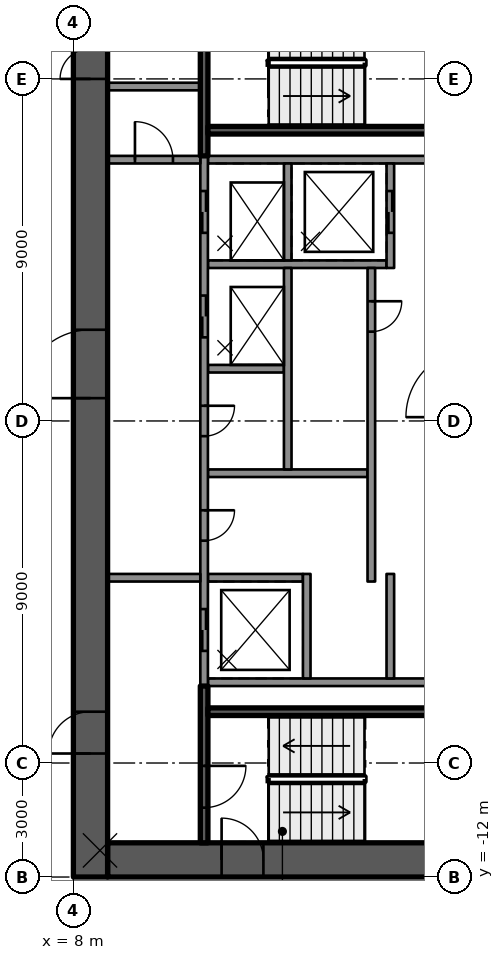
"""IFC4 building model, lengths in metres.
Left out: names, types, materials, properties, quantities, classifications, styles, units other than length and angle.
Written with IfcOpenShell. Run it as: python <this file> out.ifc"""

import sys

from ifc_helpers import new_model, si_unit, direction, frame, frame_2d, origin, place, context, subcontext, project, spatial, rectangle, extrude, element, fill, save


model = new_model("IFC4")
c1 = context("Model", 3, precision=1e-05, world=origin(), true_north=direction((0.0, 1.0)))
c2 = subcontext(c1, "Body", "Model", "MODEL_VIEW")
j1 = project(units=[si_unit("LENGTHUNIT", "METRE"), si_unit("PLANEANGLEUNIT", "RADIAN")], contexts=[c1])
p1 = place(None, origin())
s1 = spatial("IfcSite", under=j1, at=p1, CompositionType="ELEMENT")
p2 = place(p1, origin())
s2 = spatial("IfcBuilding", under=s1, at=p2, CompositionType="ELEMENT")
p3 = place(p2, frame((0.0, 0.0, 214.0)))
s3 = spatial("IfcBuildingStorey", under=s2, at=p3, CompositionType="ELEMENT", Elevation=214.0)
p4 = place(p3, frame((8.9, -11.55, 0.0), z_axis=(0.0, 0.0, 1.0), x_axis=(1.0, 0.0, 0.0)))
e1 = element("IfcWall", 1, at=p4, inside=s3, PredefinedType="SHEAR", context=c2, shape_type="SweptSolid", body=[
    extrude(rectangle(XDim=9.2, YDim=0.9, at=frame_2d((4.6, 0.0))), origin(), (0.0, 0.0, 1.0), 3.5),
])
p5 = place(p4, frame((3.0, 0.0, 0.0)))
e2 = element("IfcOpeningElement", 2, at=p5, cuts=e1, PredefinedType="OPENING", context=c2, shape_type="SweptSolid", body=[
    extrude(rectangle(XDim=1.1, YDim=2.1, at=frame_2d((0.55, 1.05))), frame((0.0, 0.46, 0.0), z_axis=(0.0, -1.0, 0.0), x_axis=(1.0, 0.0, 0.0)), (0.0, 0.0, 1.0), 0.92),
])
p6 = place(p3, frame((8.45, -12.0, 0.0), z_axis=(0.0, 0.0, 1.0), x_axis=(0.0, 1.0, 0.0)))
e3 = element("IfcWall", 3, at=p6, inside=s3, PredefinedType="SHEAR", context=c2, shape_type="SweptSolid", body=[
    extrude(rectangle(XDim=24.0, YDim=0.9, at=frame_2d((12.0, 0.0))), origin(), (0.0, 0.0, 1.0), 3.5),
])
p7 = place(p6, frame((12.6, 0.0, 0.0)))
e4 = element("IfcOpeningElement", 4, at=p7, cuts=e3, PredefinedType="OPENING", context=c2, shape_type="SweptSolid", body=[
    extrude(rectangle(XDim=1.8, YDim=2.1, at=frame_2d((0.9, 1.05))), frame((0.0, 0.46, 0.0), z_axis=(0.0, -1.0, 0.0), x_axis=(1.0, 0.0, 0.0)), (0.0, 0.0, 1.0), 0.92),
])
p8 = place(p6, frame((3.25, 0.0, 0.0)))
e5 = element("IfcOpeningElement", 5, at=p8, cuts=e3, PredefinedType="OPENING", context=c2, shape_type="SweptSolid", body=[
    extrude(rectangle(XDim=1.1, YDim=2.1, at=frame_2d((0.55, 1.05))), frame((0.0, 0.46, 0.0), z_axis=(0.0, -1.0, 0.0), x_axis=(1.0, 0.0, 0.0)), (0.0, 0.0, 1.0), 0.92),
])
p9 = place(p6, frame((21.0, 0.0, 0.0)))
e6 = element("IfcOpeningElement", 6, at=p9, cuts=e3, PredefinedType="OPENING", context=c2, shape_type="SweptSolid", body=[
    extrude(rectangle(XDim=0.8, YDim=2.1, at=frame_2d((0.4, 1.05))), frame((0.0, 0.46, 0.0), z_axis=(0.0, -1.0, 0.0), x_axis=(1.0, 0.0, 0.0)), (0.0, 0.0, 1.0), 0.92),
])
for number, where, z_axis, x_axis in (
    (7, (11.54, -6.875, 0.0), (0.0, 0.0, 1.0), (1.0, 0.0, 0.0)),
    (8, (11.54, 6.875, 0.0), (0.0, 0.0, 1.0), (1.0, 0.0, 0.0)),
):
    element("IfcWall", number, at=place(p3, frame(where, z_axis=z_axis, x_axis=x_axis)), inside=s3, PredefinedType="SOLIDWALL", context=c2, shape_type="SweptSolid", body=[
        extrude(rectangle(XDim=6.56, YDim=0.2, at=frame_2d((3.28, 0.0))), origin(), (0.0, 0.0, 1.0), 3.08),
    ])
p10 = place(p3, frame((11.54, 4.125, 0.0), z_axis=(0.0, 0.0, 1.0), x_axis=(1.0, 0.0, 0.0)))
e9 = element("IfcWall", 9, at=p10, inside=s3, PredefinedType="SOLIDWALL", context=c2, shape_type="SweptSolid", body=[
    extrude(rectangle(XDim=4.7, YDim=0.2, at=frame_2d((2.35, 0.0))), origin(), (0.0, 0.0, 1.0), 3.08),
])
p11 = place(p3, frame((11.54, 1.375, 0.0), z_axis=(0.0, 0.0, 1.0), x_axis=(1.0, 0.0, 0.0)))
e10 = element("IfcWall", 10, at=p11, inside=s3, PredefinedType="SOLIDWALL", context=c2, shape_type="SweptSolid", body=[
    extrude(rectangle(XDim=2.0, YDim=0.2, at=frame_2d((1.0, 0.0))), origin(), (0.0, 0.0, 1.0), 3.08),
])
p12 = place(p3, frame((11.54, -1.375, 0.0), z_axis=(0.0, 0.0, 1.0), x_axis=(1.0, 0.0, 0.0)))
e11 = element("IfcWall", 11, at=p12, inside=s3, PredefinedType="SOLIDWALL", context=c2, shape_type="SweptSolid", body=[
    extrude(rectangle(XDim=4.2, YDim=0.2, at=frame_2d((2.1, 0.0))), origin(), (0.0, 0.0, 1.0), 3.08),
])
p13 = place(p3, frame((11.54, -4.125, 0.0), z_axis=(0.0, 0.0, 1.0), x_axis=(1.0, 0.0, 0.0)))
e12 = element("IfcWall", 12, at=p13, inside=s3, PredefinedType="SOLIDWALL", context=c2, shape_type="SweptSolid", body=[
    extrude(rectangle(XDim=2.5, YDim=0.2, at=frame_2d((1.25, 0.0))), origin(), (0.0, 0.0, 1.0), 3.08),
])
p14 = place(p3, frame((11.44, 6.975, 0.0), z_axis=(0.0, 0.0, 1.0), x_axis=(0.0, -1.0, 0.0)))
e13 = element("IfcWall", 13, at=p14, inside=s3, PredefinedType="SOLIDWALL", context=c2, shape_type="SweptSolid", body=[
    extrude(rectangle(XDim=13.95, YDim=0.2, at=frame_2d((6.975, 0.0))), origin(), (0.0, 0.0, 1.0), 3.08),
])
p15 = place(p14, frame((0.925, 0.0, 0.0)))
e14 = element("IfcOpeningElement", 14, at=p15, cuts=e13, PredefinedType="OPENING", context=c2, shape_type="SweptSolid", body=[
    extrude(rectangle(XDim=1.1, YDim=2.1, at=frame_2d((0.55, 1.05))), frame((0.0, 0.11, 0.0), z_axis=(0.0, -1.0, 0.0), x_axis=(1.0, 0.0, 0.0)), (0.0, 0.0, 1.0), 0.22),
])
p16 = place(p14, frame((3.675, 0.0, 0.0)))
e15 = element("IfcOpeningElement", 15, at=p16, cuts=e13, PredefinedType="OPENING", context=c2, shape_type="SweptSolid", body=[
    extrude(rectangle(XDim=1.1, YDim=2.1, at=frame_2d((0.55, 1.05))), frame((0.0, 0.11, 0.0), z_axis=(0.0, -1.0, 0.0), x_axis=(1.0, 0.0, 0.0)), (0.0, 0.0, 1.0), 0.22),
])
p17 = place(p14, frame((11.925, 0.0, 0.0)))
e16 = element("IfcOpeningElement", 16, at=p17, cuts=e13, PredefinedType="OPENING", context=c2, shape_type="SweptSolid", body=[
    extrude(rectangle(XDim=1.1, YDim=2.1, at=frame_2d((0.55, 1.05))), frame((0.0, 0.11, 0.0), z_axis=(0.0, -1.0, 0.0), x_axis=(1.0, 0.0, 0.0)), (0.0, 0.0, 1.0), 0.22),
])
p18 = place(p14, frame((6.575, 0.0, 0.0)))
e17 = element("IfcOpeningElement", 17, at=p18, cuts=e13, PredefinedType="OPENING", context=c2, shape_type="SweptSolid", body=[
    extrude(rectangle(XDim=0.8, YDim=2.1, at=frame_2d((0.4, 1.05))), frame((0.0, 0.11, 0.0), z_axis=(0.0, -1.0, 0.0), x_axis=(1.0, 0.0, 0.0)), (0.0, 0.0, 1.0), 0.22),
])
p19 = place(p14, frame((9.325, 0.0, 0.0)))
e18 = element("IfcOpeningElement", 18, at=p19, cuts=e13, PredefinedType="OPENING", context=c2, shape_type="SweptSolid", body=[
    extrude(rectangle(XDim=0.8, YDim=2.1, at=frame_2d((0.4, 1.05))), frame((0.0, 0.11, 0.0), z_axis=(0.0, -1.0, 0.0), x_axis=(1.0, 0.0, 0.0)), (0.0, 0.0, 1.0), 0.22),
])
p20 = place(p3, frame((13.64, 6.775, 0.0), z_axis=(0.0, 0.0, 1.0), x_axis=(0.0, -1.0, 0.0)))
e19 = element("IfcWall", 19, at=p20, inside=s3, PredefinedType="SOLIDWALL", context=c2, shape_type="SweptSolid", body=[
    extrude(rectangle(XDim=2.55, YDim=0.2, at=frame_2d((1.275, 0.0))), origin(), (0.0, 0.0, 1.0), 3.08),
])
p21 = place(p3, frame((13.64, 4.025, 0.0), z_axis=(0.0, 0.0, 1.0), x_axis=(0.0, -1.0, 0.0)))
e20 = element("IfcWall", 20, at=p21, inside=s3, PredefinedType="SOLIDWALL", context=c2, shape_type="SweptSolid", body=[
    extrude(rectangle(XDim=5.3, YDim=0.2, at=frame_2d((2.65, 0.0))), origin(), (0.0, 0.0, 1.0), 3.08),
])
p22 = place(p3, frame((14.14, -4.025, 0.0), z_axis=(0.0, 0.0, 1.0), x_axis=(0.0, -1.0, 0.0)))
e21 = element("IfcWall", 21, at=p22, inside=s3, PredefinedType="SOLIDWALL", context=c2, shape_type="SweptSolid", body=[
    extrude(rectangle(XDim=2.75, YDim=0.2, at=frame_2d((1.375, 0.0))), origin(), (0.0, 0.0, 1.0), 3.08),
])
p23 = place(p3, frame((16.34, 6.775, 0.0), z_axis=(0.0, 0.0, 1.0), x_axis=(0.0, -1.0, 0.0)))
e22 = element("IfcWall", 22, at=p23, inside=s3, PredefinedType="SOLIDWALL", context=c2, shape_type="SweptSolid", body=[
    extrude(rectangle(XDim=2.75, YDim=0.2, at=frame_2d((1.375, 0.0))), origin(), (0.0, 0.0, 1.0), 3.08),
])
p24 = place(p23, frame((0.725, 0.0, 0.0)))
e23 = element("IfcOpeningElement", 23, at=p24, cuts=e22, PredefinedType="OPENING", context=c2, shape_type="SweptSolid", body=[
    extrude(rectangle(XDim=1.1, YDim=2.1, at=frame_2d((0.55, 1.05))), frame((0.0, 0.11, 0.0), z_axis=(0.0, -1.0, 0.0), x_axis=(1.0, 0.0, 0.0)), (0.0, 0.0, 1.0), 0.22),
])
p25 = place(p3, frame((15.84, 4.025, 0.0), z_axis=(0.0, 0.0, 1.0), x_axis=(0.0, -1.0, 0.0)))
e24 = element("IfcWall", 24, at=p25, inside=s3, PredefinedType="SOLIDWALL", context=c2, shape_type="SweptSolid", body=[
    extrude(rectangle(XDim=8.25, YDim=0.2, at=frame_2d((4.125, 0.0))), origin(), (0.0, 0.0, 1.0), 3.08),
])
p26 = place(p25, frame((0.875, 0.0, 0.0)))
e25 = element("IfcOpeningElement", 25, at=p26, cuts=e24, PredefinedType="OPENING", context=c2, shape_type="SweptSolid", body=[
    extrude(rectangle(XDim=0.8, YDim=2.1, at=frame_2d((0.4, 1.05))), frame((0.0, 0.11, 0.0), z_axis=(0.0, -1.0, 0.0), x_axis=(1.0, 0.0, 0.0)), (0.0, 0.0, 1.0), 0.22),
])
p27 = place(p3, frame((16.34, -4.025, 0.0), z_axis=(0.0, 0.0, 1.0), x_axis=(0.0, -1.0, 0.0)))
e26 = element("IfcWall", 26, at=p27, inside=s3, PredefinedType="SOLIDWALL", context=c2, shape_type="SweptSolid", body=[
    extrude(rectangle(XDim=2.75, YDim=0.2, at=frame_2d((1.375, 0.0))), origin(), (0.0, 0.0, 1.0), 3.08),
])
p28 = place(p3, frame((11.44, -6.975, 0.0), z_axis=(0.0, 0.0, 1.0), x_axis=(0.0, -1.0, 0.0)))
e27 = element("IfcWall", 27, at=p28, inside=s3, PredefinedType="SOLIDWALL", context=c2, shape_type="SweptSolid", body=[
    extrude(rectangle(XDim=4.125, YDim=0.2, at=frame_2d((2.062, 0.0))), origin(), (0.0, 0.0, 1.0), 3.08),
])
p29 = place(p28, frame((2.1, 0.0, 0.0)))
e28 = element("IfcOpeningElement", 28, at=p29, cuts=e27, PredefinedType="OPENING", context=c2, shape_type="SweptSolid", body=[
    extrude(rectangle(XDim=1.1, YDim=2.1, at=frame_2d((0.55, 1.05))), frame((0.0, 0.11, 0.0), z_axis=(0.0, -1.0, 0.0), x_axis=(1.0, 0.0, 0.0)), (0.0, 0.0, 1.0), 0.22),
])
p30 = place(p3, frame((11.54, -7.65, 0.0), z_axis=(0.0, 0.0, 1.0), x_axis=(1.0, 0.0, 0.0)))
e29 = element("IfcWall", 29, at=p30, inside=s3, PredefinedType="SOLIDWALL", context=c2, shape_type="SweptSolid", body=[
    extrude(rectangle(XDim=6.56, YDim=0.2, at=frame_2d((3.28, 0.0))), origin(), (0.0, 0.0, 1.0), 3.08),
])
p31 = place(p3, frame((11.44, 11.1, 0.0), z_axis=(0.0, 0.0, 1.0), x_axis=(0.0, -1.0, 0.0)))
e30 = element("IfcWall", 30, at=p31, inside=s3, PredefinedType="SOLIDWALL", context=c2, shape_type="SweptSolid", body=[
    extrude(rectangle(XDim=4.125, YDim=0.2, at=frame_2d((2.062, 0.0))), origin(), (0.0, 0.0, 1.0), 3.08),
])
p32 = place(p3, frame((11.54, 7.65, 0.0), z_axis=(0.0, 0.0, 1.0), x_axis=(1.0, 0.0, 0.0)))
e31 = element("IfcWall", 31, at=p32, inside=s3, PredefinedType="SOLIDWALL", context=c2, shape_type="SweptSolid", body=[
    extrude(rectangle(XDim=6.56, YDim=0.2, at=frame_2d((3.28, 0.0))), origin(), (0.0, 0.0, 1.0), 3.08),
])
p33 = place(p3, frame((8.9, -4.125, 0.0), z_axis=(0.0, 0.0, 1.0), x_axis=(1.0, 0.0, 0.0)))
e32 = element("IfcWall", 32, at=p33, inside=s3, PredefinedType="PARTITIONING", context=c2, shape_type="SweptSolid", body=[
    extrude(rectangle(XDim=2.44, YDim=0.2, at=frame_2d((1.22, 0.0))), origin(), (0.0, 0.0, 1.0), 3.08),
])
p34 = place(p3, frame((8.9, 6.875, 0.0), z_axis=(0.0, 0.0, 1.0), x_axis=(1.0, 0.0, 0.0)))
e33 = element("IfcWall", 33, at=p34, inside=s3, PredefinedType="PARTITIONING", context=c2, shape_type="SweptSolid", body=[
    extrude(rectangle(XDim=2.44, YDim=0.2, at=frame_2d((1.22, 0.0))), origin(), (0.0, 0.0, 1.0), 3.08),
])
p35 = place(p34, frame((0.72, 0.0, 0.0)))
e34 = element("IfcOpeningElement", 34, at=p35, cuts=e33, PredefinedType="OPENING", context=c2, shape_type="SweptSolid", body=[
    extrude(rectangle(XDim=1.0, YDim=2.1, at=frame_2d((0.5, 1.05))), frame((0.0, 0.11, 0.0), z_axis=(0.0, -1.0, 0.0), x_axis=(1.0, 0.0, 0.0)), (0.0, 0.0, 1.0), 0.22),
])
p36 = place(p3, frame((8.9, 8.8, 0.0), z_axis=(0.0, 0.0, 1.0), x_axis=(1.0, 0.0, 0.0)))
e35 = element("IfcWall", 35, at=p36, inside=s3, PredefinedType="PARTITIONING", context=c2, shape_type="SweptSolid", body=[
    extrude(rectangle(XDim=2.44, YDim=0.2, at=frame_2d((1.22, 0.0))), origin(), (0.0, 0.0, 1.0), 3.08),
])
p37 = place(p15, origin())
e36 = element("IfcDoor", 36, at=p37, inside=s3, OperationType="DOUBLE_DOOR_SLIDING", PredefinedType="DOOR", context=c2, shape_type="SweptSolid", body=[
    extrude(rectangle(XDim=1.1, YDim=2.1, at=frame_2d((0.55, 1.05))), frame((0.0, 0.025, 0.0), z_axis=(0.0, -1.0, 0.0), x_axis=(1.0, 0.0, 0.0)), (0.0, 0.0, 1.0), 0.05),
])
fill(e14, e36)
p38 = place(p24, origin())
e37 = element("IfcDoor", 37, at=p38, inside=s3, OperationType="DOUBLE_DOOR_SLIDING", PredefinedType="DOOR", context=c2, shape_type="SweptSolid", body=[
    extrude(rectangle(XDim=1.1, YDim=2.1, at=frame_2d((0.55, 1.05))), frame((0.0, 0.025, 0.0), z_axis=(0.0, -1.0, 0.0), x_axis=(1.0, 0.0, 0.0)), (0.0, 0.0, 1.0), 0.05),
])
fill(e23, e37)
p39 = place(p16, origin())
e38 = element("IfcDoor", 38, at=p39, inside=s3, OperationType="DOUBLE_DOOR_SLIDING", PredefinedType="DOOR", context=c2, shape_type="SweptSolid", body=[
    extrude(rectangle(XDim=1.1, YDim=2.1, at=frame_2d((0.55, 1.05))), frame((0.0, 0.025, 0.0), z_axis=(0.0, -1.0, 0.0), x_axis=(1.0, 0.0, 0.0)), (0.0, 0.0, 1.0), 0.05),
])
fill(e15, e38)
p40 = place(p17, origin())
e39 = element("IfcDoor", 39, at=p40, inside=s3, OperationType="DOUBLE_DOOR_SLIDING", PredefinedType="DOOR", context=c2, shape_type="SweptSolid", body=[
    extrude(rectangle(XDim=1.1, YDim=2.1, at=frame_2d((0.55, 1.05))), frame((0.0, 0.025, 0.0), z_axis=(0.0, -1.0, 0.0), x_axis=(1.0, 0.0, 0.0)), (0.0, 0.0, 1.0), 0.05),
])
fill(e16, e39)
p41 = place(p26, origin())
e40 = element("IfcDoor", 40, at=p41, inside=s3, OperationType="SINGLE_SWING_LEFT", PredefinedType="DOOR", context=c2, shape_type="SweptSolid", body=[
    extrude(rectangle(XDim=0.8, YDim=2.1, at=frame_2d((0.4, 1.05))), frame((0.0, 0.025, 0.0), z_axis=(0.0, -1.0, 0.0), x_axis=(1.0, 0.0, 0.0)), (0.0, 0.0, 1.0), 0.05),
])
fill(e25, e40)
p42 = place(p18, origin())
e41 = element("IfcDoor", 41, at=p42, inside=s3, OperationType="SINGLE_SWING_LEFT", PredefinedType="DOOR", context=c2, shape_type="SweptSolid", body=[
    extrude(rectangle(XDim=0.8, YDim=2.1, at=frame_2d((0.4, 1.05))), frame((0.0, 0.025, 0.0), z_axis=(0.0, -1.0, 0.0), x_axis=(1.0, 0.0, 0.0)), (0.0, 0.0, 1.0), 0.05),
])
fill(e17, e41)
p43 = place(p19, origin())
e42 = element("IfcDoor", 42, at=p43, inside=s3, OperationType="SINGLE_SWING_LEFT", PredefinedType="DOOR", context=c2, shape_type="SweptSolid", body=[
    extrude(rectangle(XDim=0.8, YDim=2.1, at=frame_2d((0.4, 1.05))), frame((0.0, 0.025, 0.0), z_axis=(0.0, -1.0, 0.0), x_axis=(1.0, 0.0, 0.0)), (0.0, 0.0, 1.0), 0.05),
])
fill(e18, e42)
p44 = place(p7, origin())
e43 = element("IfcDoor", 43, at=p44, inside=s3, OperationType="SINGLE_SWING_RIGHT", PredefinedType="DOOR", context=c2, shape_type="SweptSolid", body=[
    extrude(rectangle(XDim=1.8, YDim=2.1, at=frame_2d((0.9, 1.05))), frame((0.0, 0.025, 0.0), z_axis=(0.0, -1.0, 0.0), x_axis=(1.0, 0.0, 0.0)), (0.0, 0.0, 1.0), 0.05),
])
fill(e4, e43)
p45 = place(p8, origin())
e44 = element("IfcDoor", 44, at=p45, inside=s3, OperationType="SINGLE_SWING_LEFT", PredefinedType="DOOR", context=c2, shape_type="SweptSolid", body=[
    extrude(rectangle(XDim=1.1, YDim=2.1, at=frame_2d((0.55, 1.05))), frame((0.0, 0.025, 0.0), z_axis=(0.0, -1.0, 0.0), x_axis=(1.0, 0.0, 0.0)), (0.0, 0.0, 1.0), 0.05),
])
fill(e5, e44)
p46 = place(p5, origin())
e45 = element("IfcDoor", 45, at=p46, inside=s3, OperationType="SINGLE_SWING_LEFT", PredefinedType="DOOR", context=c2, shape_type="SweptSolid", body=[
    extrude(rectangle(XDim=1.1, YDim=2.1, at=frame_2d((0.55, 1.05))), frame((0.0, 0.025, 0.0), z_axis=(0.0, -1.0, 0.0), x_axis=(1.0, 0.0, 0.0)), (0.0, 0.0, 1.0), 0.05),
])
fill(e2, e45)
p47 = place(p29, origin())
e46 = element("IfcDoor", 46, at=p47, inside=s3, OperationType="SINGLE_SWING_RIGHT", PredefinedType="DOOR", context=c2, shape_type="SweptSolid", body=[
    extrude(rectangle(XDim=1.1, YDim=2.1, at=frame_2d((0.55, 1.05))), frame((0.0, 0.025, 0.0), z_axis=(0.0, -1.0, 0.0), x_axis=(1.0, 0.0, 0.0)), (0.0, 0.0, 1.0), 0.05),
])
fill(e28, e46)
p48 = place(p9, origin())
e47 = element("IfcDoor", 47, at=p48, inside=s3, OperationType="SINGLE_SWING_RIGHT", PredefinedType="DOOR", context=c2, shape_type="SweptSolid", body=[
    extrude(rectangle(XDim=0.8, YDim=2.1, at=frame_2d((0.4, 1.05))), frame((0.0, 0.025, 0.0), z_axis=(0.0, -1.0, 0.0), x_axis=(1.0, 0.0, 0.0)), (0.0, 0.0, 1.0), 0.05),
])
fill(e6, e47)
p49 = place(p35, origin())
e48 = element("IfcDoor", 48, at=p49, inside=s3, OperationType="SINGLE_SWING_RIGHT", PredefinedType="DOOR", context=c2, shape_type="SweptSolid", body=[
    extrude(rectangle(XDim=1.0, YDim=2.1, at=frame_2d((0.5, 1.05))), frame((0.0, 0.025, 0.0), z_axis=(0.0, -1.0, 0.0), x_axis=(1.0, 0.0, 0.0)), (0.0, 0.0, 1.0), 0.05),
])
fill(e34, e48)
save(model, sys.argv[1])
